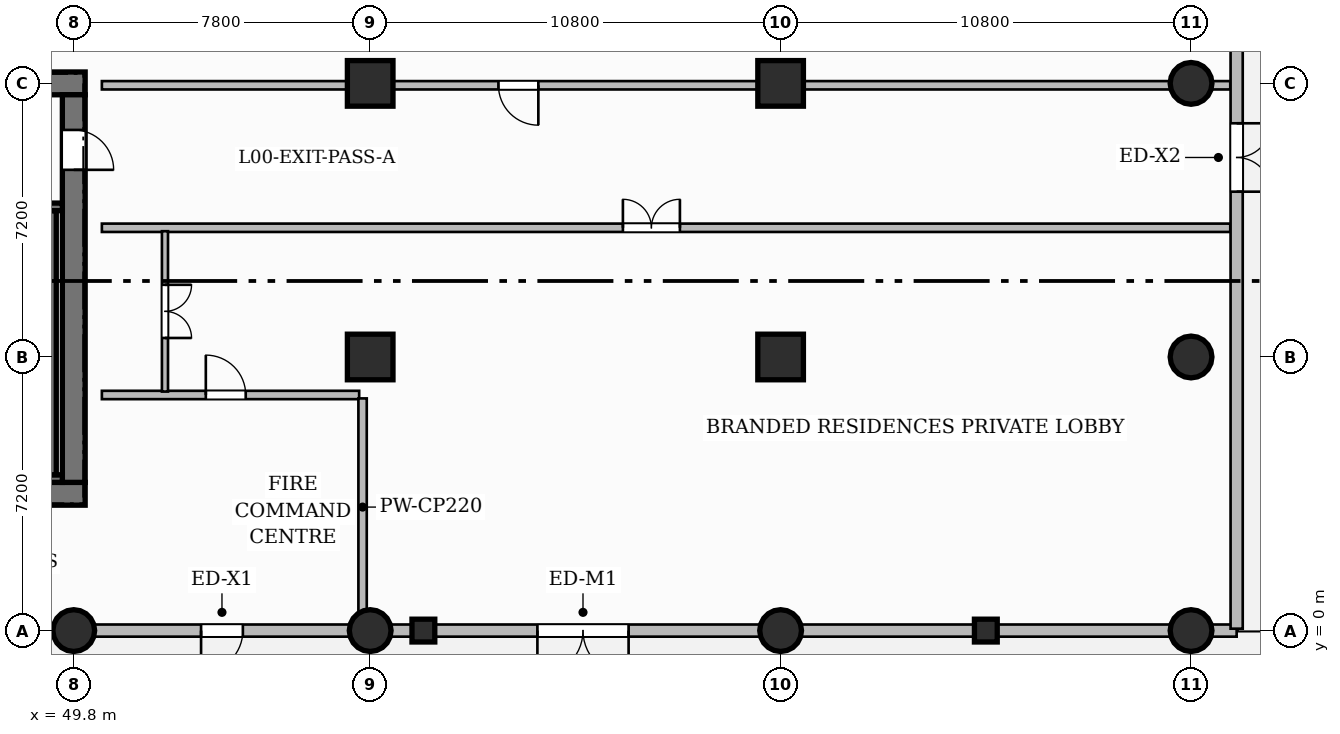
"""IFC4 building model, lengths in metres.
Left out: names, types, materials, properties, quantities, classifications, styles, units other than length and angle.
Written with IfcOpenShell. Run it as: python <this file> out.ifc"""

import sys

from ifc_helpers import new_model, si_unit, direction, frame, frame_2d, origin, origin_2d, place, context, subcontext, project, spatial, rectangle, circle, extrude, source, transform, mapped, element, fill, save


model = new_model("IFC4")
c1 = context("Model", 3, precision=1e-05, world=origin(), true_north=direction((0.0, 1.0)))
c2 = subcontext(c1, "Body", "Model", "MODEL_VIEW")
j1 = project(units=[si_unit("LENGTHUNIT", "METRE"), si_unit("PLANEANGLEUNIT", "RADIAN")], contexts=[c1])
p1 = place(None, origin())
s1 = spatial("IfcSite", under=j1, at=p1, CompositionType="ELEMENT")
p2 = place(p1, origin())
s2 = spatial("IfcBuilding", under=s1, at=p2, CompositionType="ELEMENT")
p3 = place(p2, origin())
s3 = spatial("IfcBuildingStorey", under=s2, at=p3, CompositionType="ELEMENT", Elevation=0.0)
p4 = place(p3, frame((34.5, 3.6, 0.0), z_axis=(0.0, 0.0, 1.0), x_axis=(1.0, 0.0, 0.0)))
e1 = element("IfcWall", 1, at=p4, inside=s3, PredefinedType="SHEAR", context=c2, shape_type="SweptSolid", body=[
    extrude(rectangle(XDim=15.6, YDim=0.6, at=frame_2d((7.8, 0.0))), origin(), (0.0, 0.0, 1.0), 5.4),
])
p5 = place(p4, frame((4.77, 0.0, 0.0)))
e2 = element("IfcOpeningElement", 2, at=p5, cuts=e1, PredefinedType="OPENING", context=c2, shape_type="SweptSolid", body=[
    extrude(rectangle(XDim=0.9, YDim=2.1, at=frame_2d((0.45, 1.05))), frame((0.0, 0.31, 0.0), z_axis=(0.0, -1.0, 0.0), x_axis=(1.0, 0.0, 0.0)), (0.0, 0.0, 1.0), 0.62),
])
p6 = place(p4, frame((7.15, 0.0, 0.0)))
e3 = element("IfcOpeningElement", 3, at=p6, cuts=e1, PredefinedType="OPENING", context=c2, shape_type="SweptSolid", body=[
    extrude(rectangle(XDim=0.9, YDim=2.1, at=frame_2d((0.45, 1.05))), frame((0.0, 0.31, 0.0), z_axis=(0.0, -1.0, 0.0), x_axis=(1.0, 0.0, 0.0)), (0.0, 0.0, 1.0), 0.62),
])
p7 = place(p3, frame((34.5, 14.4, 0.0), z_axis=(0.0, 0.0, 1.0), x_axis=(1.0, 0.0, 0.0)))
e4 = element("IfcWall", 4, at=p7, inside=s3, PredefinedType="SHEAR", context=c2, shape_type="SweptSolid", body=[
    extrude(rectangle(XDim=15.6, YDim=0.6, at=frame_2d((7.8, 0.0))), origin(), (0.0, 0.0, 1.0), 5.4),
])
p8 = place(p7, frame((5.43, 0.0, 0.0)))
e5 = element("IfcOpeningElement", 5, at=p8, cuts=e4, PredefinedType="OPENING", context=c2, shape_type="SweptSolid", body=[
    extrude(rectangle(XDim=1.5, YDim=2.2, at=frame_2d((0.75, 1.1))), frame((0.0, 0.31, 0.0), z_axis=(0.0, -1.0, 0.0), x_axis=(1.0, 0.0, 0.0)), (0.0, 0.0, 1.0), 0.62),
])
p9 = place(p7, frame((1.645, 0.0, 0.0)))
e6 = element("IfcOpeningElement", 6, at=p9, cuts=e4, PredefinedType="OPENING", context=c2, shape_type="SweptSolid", body=[
    extrude(rectangle(XDim=1.05, YDim=2.15, at=frame_2d((0.525, 1.075))), frame((0.0, 0.31, 0.0), z_axis=(0.0, -1.0, 0.0), x_axis=(1.0, 0.0, 0.0)), (0.0, 0.0, 1.0), 0.62),
])
p10 = place(p7, frame((11.275, 0.0, 0.0)))
e7 = element("IfcOpeningElement", 7, at=p10, cuts=e4, PredefinedType="OPENING", context=c2, shape_type="SweptSolid", body=[
    extrude(rectangle(XDim=1.05, YDim=2.15, at=frame_2d((0.525, 1.075))), frame((0.0, 0.31, 0.0), z_axis=(0.0, -1.0, 0.0), x_axis=(1.0, 0.0, 0.0)), (0.0, 0.0, 1.0), 0.62),
])
p11 = place(p3, frame((49.8, 3.9, 0.0), z_axis=(0.0, 0.0, 1.0), x_axis=(0.0, 1.0, 0.0)))
e8 = element("IfcWall", 8, at=p11, inside=s3, PredefinedType="SHEAR", context=c2, shape_type="SweptSolid", body=[
    extrude(rectangle(XDim=10.2, YDim=0.6, at=frame_2d((5.1, 0.0))), origin(), (0.0, 0.0, 1.0), 5.4),
])
p12 = place(p11, frame((8.225, 0.0, 0.0)))
e9 = element("IfcOpeningElement", 9, at=p12, cuts=e8, PredefinedType="OPENING", context=c2, shape_type="SweptSolid", body=[
    extrude(rectangle(XDim=1.05, YDim=2.2, at=frame_2d((0.525, 1.1))), frame((0.0, 0.31, 0.0), z_axis=(0.0, -1.0, 0.0), x_axis=(1.0, 0.0, 0.0)), (0.0, 0.0, 1.0), 0.62),
])
m1 = source(origin(), c2, "Body", "SweptSolid", [
    extrude(circle(Radius=0.55, at=origin_2d()), origin(), (0.0, 0.0, 1.0), 5.4),
])
for number, where, z_axis, x_axis in (
    (10, (49.8, 0.0, 0.0), (0.0, 0.0, 1.0), (1.0, 0.0, 0.0)),
    (11, (57.6, 0.0, 0.0), (0.0, 0.0, 1.0), (1.0, 0.0, 0.0)),
):
    element("IfcColumn", number, at=place(p3, frame(where, z_axis=z_axis, x_axis=x_axis)), inside=s3, PredefinedType="COLUMN", context=c2, shape_type="MappedRepresentation", body=[
        mapped(m1, transform((0.0, 0.0, 0.0), scale=1.0)),
    ])
m2 = source(origin(), c2, "Body", "SweptSolid", [
    extrude(rectangle(XDim=1.2, YDim=1.2, at=origin_2d()), origin(), (0.0, 0.0, 1.0), 5.4),
])
for number, where, z_axis, x_axis in (
    (12, (57.6, 7.2, 0.0), (0.0, 0.0, 1.0), (1.0, 0.0, 0.0)),
    (13, (57.6, 14.4, 0.0), (0.0, 0.0, 1.0), (1.0, 0.0, 0.0)),
):
    element("IfcColumn", number, at=place(p3, frame(where, z_axis=z_axis, x_axis=x_axis)), inside=s3, PredefinedType="COLUMN", context=c2, shape_type="MappedRepresentation", body=[
        mapped(m2, transform((0.0, 0.0, 0.0), scale=1.0)),
    ])
p13 = place(p3, frame((68.4, 0.0, 0.0), z_axis=(0.0, 0.0, 1.0), x_axis=(1.0, 0.0, 0.0)))
e14 = element("IfcColumn", 14, at=p13, inside=s3, PredefinedType="COLUMN", context=c2, shape_type="MappedRepresentation", body=[
    mapped(m1, transform((0.0, 0.0, 0.0), scale=1.0)),
])
for number, where, z_axis, x_axis in (
    (15, (68.4, 7.2, 0.0), (0.0, 0.0, 1.0), (1.0, 0.0, 0.0)),
    (16, (68.4, 14.4, 0.0), (0.0, 0.0, 1.0), (1.0, 0.0, 0.0)),
):
    element("IfcColumn", number, at=place(p3, frame(where, z_axis=z_axis, x_axis=x_axis)), inside=s3, PredefinedType="COLUMN", context=c2, shape_type="MappedRepresentation", body=[
        mapped(m2, transform((0.0, 0.0, 0.0), scale=1.0)),
    ])
for number, where, z_axis, x_axis in (
    (17, (79.2, 0.0, 0.0), (0.0, 0.0, 1.0), (1.0, 0.0, 0.0)),
    (18, (79.2, 7.2, 0.0), (0.0, 0.0, 1.0), (1.0, 0.0, 0.0)),
    (19, (79.2, 14.4, 0.0), (0.0, 0.0, 1.0), (1.0, 0.0, 0.0)),
):
    element("IfcColumn", number, at=place(p3, frame(where, z_axis=z_axis, x_axis=x_axis)), inside=s3, PredefinedType="COLUMN", context=c2, shape_type="MappedRepresentation", body=[
        mapped(m1, transform((0.0, 0.0, 0.0), scale=1.0)),
    ])
m3 = source(origin(), c2, "Body", "SweptSolid", [
    extrude(rectangle(XDim=0.6, YDim=0.6, at=origin_2d()), origin(), (0.0, 0.0, 1.0), 5.4),
])
for number, where, z_axis, x_axis in (
    (20, (59.0, 0.0, 0.0), (0.0, 0.0, 1.0), (1.0, 0.0, 0.0)),
    (21, (73.8, 0.0, 0.0), (0.0, 0.0, 1.0), (1.0, 0.0, 0.0)),
):
    element("IfcColumn", number, at=place(p3, frame(where, z_axis=z_axis, x_axis=x_axis)), inside=s3, PredefinedType="PILASTER", context=c2, shape_type="MappedRepresentation", body=[
        mapped(m3, transform((0.0, 0.0, 0.0), scale=1.0)),
    ])
p14 = place(p3, frame((43.12, 4.0, 0.0), z_axis=(0.0, 0.0, 1.0), x_axis=(1.0, 0.0, 0.0)))
e22 = element("IfcWall", 22, at=p14, inside=s3, PredefinedType="SHEAR", context=c2, shape_type="SweptSolid", body=[
    extrude(rectangle(XDim=6.38, YDim=0.2, at=frame_2d((3.19, 0.0))), origin(), (0.0, 0.0, 1.0), 5.4),
])
p15 = place(p3, frame((49.24, 4.1, 0.0), z_axis=(0.0, 0.0, 1.0), x_axis=(0.0, 1.0, 0.0)))
e23 = element("IfcWall", 23, at=p15, inside=s3, PredefinedType="SHEAR", context=c2, shape_type="SweptSolid", body=[
    extrude(rectangle(XDim=6.95, YDim=0.2, at=frame_2d((3.475, 0.0))), origin(), (0.0, 0.0, 1.0), 5.4),
])
p16 = place(p3, frame((43.12, 11.15, 0.0), z_axis=(0.0, 0.0, 1.0), x_axis=(1.0, 0.0, 0.0)))
e24 = element("IfcWall", 24, at=p16, inside=s3, PredefinedType="SHEAR", context=c2, shape_type="SweptSolid", body=[
    extrude(rectangle(XDim=6.38, YDim=0.2, at=frame_2d((3.19, 0.0))), origin(), (0.0, 0.0, 1.0), 5.4),
])
p17 = place(p16, frame((1.045, 0.0, 0.0)))
e25 = element("IfcOpeningElement", 25, at=p17, cuts=e24, PredefinedType="OPENING", context=c2, shape_type="SweptSolid", body=[
    extrude(rectangle(XDim=1.05, YDim=2.2, at=frame_2d((0.525, 1.1))), frame((0.0, 0.11, 0.0), z_axis=(0.0, -1.0, 0.0), x_axis=(1.0, 0.0, 0.0)), (0.0, 0.0, 1.0), 0.22),
])
p18 = place(p16, frame((4.125, 0.0, 0.0)))
e26 = element("IfcOpeningElement", 26, at=p18, cuts=e24, PredefinedType="OPENING", context=c2, shape_type="SweptSolid", body=[
    extrude(rectangle(XDim=1.05, YDim=2.2, at=frame_2d((0.525, 1.1))), frame((0.0, 0.11, 0.0), z_axis=(0.0, -1.0, 0.0), x_axis=(1.0, 0.0, 0.0)), (0.0, 0.0, 1.0), 0.22),
])
p19 = place(p3, frame((50.54, 10.6, 0.0), z_axis=(0.0, 0.0, 1.0), x_axis=(1.0, 0.0, 0.0)))
e27 = element("IfcWall", 27, at=p19, inside=s3, PredefinedType="PARTITIONING", context=c2, shape_type="SweptSolid", body=[
    extrude(rectangle(XDim=29.692, YDim=0.22, at=frame_2d((14.846, 0.0))), origin(), (0.0, 0.0, 1.0), 5.1),
])
p20 = place(p19, frame((13.71, 0.0, 0.0)))
e28 = element("IfcOpeningElement", 28, at=p20, cuts=e27, PredefinedType="OPENING", context=c2, shape_type="SweptSolid", body=[
    extrude(rectangle(XDim=1.5, YDim=2.2, at=frame_2d((0.75, 1.1))), frame((0.0, 0.12, 0.0), z_axis=(0.0, -1.0, 0.0), x_axis=(1.0, 0.0, 0.0)), (0.0, 0.0, 1.0), 0.24),
])
p21 = place(p3, frame((50.54, 14.35, 0.0), z_axis=(0.0, 0.0, 1.0), x_axis=(1.0, 0.0, 0.0)))
e29 = element("IfcWall", 29, at=p21, inside=s3, PredefinedType="PARTITIONING", context=c2, shape_type="SweptSolid", body=[
    extrude(rectangle(XDim=29.692, YDim=0.22, at=frame_2d((14.846, 0.0))), origin(), (0.0, 0.0, 1.0), 4.085),
])
p22 = place(p21, frame((10.435, 0.0, 0.0)))
e30 = element("IfcOpeningElement", 30, at=p22, cuts=e29, PredefinedType="OPENING", context=c2, shape_type="SweptSolid", body=[
    extrude(rectangle(XDim=1.05, YDim=2.15, at=frame_2d((0.525, 1.075))), frame((0.0, 0.12, 0.0), z_axis=(0.0, -1.0, 0.0), x_axis=(1.0, 0.0, 0.0)), (0.0, 0.0, 1.0), 0.24),
])
p23 = place(p3, frame((50.54, 6.2, 0.0), z_axis=(0.0, 0.0, 1.0), x_axis=(1.0, 0.0, 0.0)))
e31 = element("IfcWall", 31, at=p23, inside=s3, PredefinedType="PARTITIONING", context=c2, shape_type="SweptSolid", body=[
    extrude(rectangle(XDim=6.77, YDim=0.22, at=frame_2d((3.385, 0.0))), origin(), (0.0, 0.0, 1.0), 5.1),
])
p24 = place(p23, frame((2.735, 0.0, 0.0)))
e32 = element("IfcOpeningElement", 32, at=p24, cuts=e31, PredefinedType="OPENING", context=c2, shape_type="SweptSolid", body=[
    extrude(rectangle(XDim=1.05, YDim=2.15, at=frame_2d((0.525, 1.075))), frame((0.0, 0.12, 0.0), z_axis=(0.0, -1.0, 0.0), x_axis=(1.0, 0.0, 0.0)), (0.0, 0.0, 1.0), 0.24),
])
p25 = place(p3, frame((57.4, 0.39, 0.0), z_axis=(0.0, 0.0, 1.0), x_axis=(0.0, 1.0, 0.0)))
e33 = element("IfcWall", 33, at=p25, inside=s3, PredefinedType="PARTITIONING", context=c2, shape_type="SweptSolid", body=[
    extrude(rectangle(XDim=5.72, YDim=0.22, at=frame_2d((2.86, 0.0))), origin(), (0.0, 0.0, 1.0), 4.085),
])
p26 = place(p3, frame((52.2, 10.51, 0.0), z_axis=(0.0, 0.0, 1.0), x_axis=(0.0, -1.0, 0.0)))
e34 = element("IfcWall", 34, at=p26, inside=s3, PredefinedType="PARTITIONING", context=c2, shape_type="SweptSolid", body=[
    extrude(rectangle(XDim=4.22, YDim=0.16, at=frame_2d((2.11, 0.0))), origin(), (0.0, 0.0, 1.0), 5.1),
])
p27 = place(p26, frame((1.41, 0.0, 0.0)))
e35 = element("IfcOpeningElement", 35, at=p27, cuts=e34, PredefinedType="OPENING", context=c2, shape_type="SweptSolid", body=[
    extrude(rectangle(XDim=1.4, YDim=2.35, at=frame_2d((0.7, 1.175))), frame((0.0, 0.09, 0.0), z_axis=(0.0, -1.0, 0.0), x_axis=(1.0, 0.0, 0.0)), (0.0, 0.0, 1.0), 0.18),
])
p28 = place(p3, frame((28.35, 0.0, 0.0), z_axis=(0.0, 0.0, 1.0), x_axis=(1.0, 0.0, 0.0)))
e36 = element("IfcWall", 36, at=p28, inside=s3, PredefinedType="SOLIDWALL", context=c2, shape_type="SweptSolid", body=[
    extrude(rectangle(XDim=52.05, YDim=0.32, at=frame_2d((26.025, 0.0))), origin(), (0.0, 0.0, 1.0), 4.085),
])
p29 = place(p28, frame((24.8, 0.0, 0.0)))
e37 = element("IfcOpeningElement", 37, at=p29, cuts=e36, PredefinedType="OPENING", context=c2, shape_type="SweptSolid", body=[
    extrude(rectangle(XDim=1.1, YDim=2.2, at=frame_2d((0.55, 1.1))), frame((0.0, 0.17, 0.0), z_axis=(0.0, -1.0, 0.0), x_axis=(1.0, 0.0, 0.0)), (0.0, 0.0, 1.0), 0.34),
])
p30 = place(p28, frame((33.65, 0.0, 0.0)))
e38 = element("IfcOpeningElement", 38, at=p30, cuts=e36, PredefinedType="OPENING", context=c2, shape_type="SweptSolid", body=[
    extrude(rectangle(XDim=2.4, YDim=2.8, at=frame_2d((1.2, 1.4))), frame((0.0, 0.17, 0.0), z_axis=(0.0, -1.0, 0.0), x_axis=(1.0, 0.0, 0.0)), (0.0, 0.0, 1.0), 0.34),
])
p31 = place(p3, frame((80.4, 0.05, 0.0), z_axis=(0.0, 0.0, 1.0), x_axis=(0.0, 1.0, 0.0)))
e39 = element("IfcWall", 39, at=p31, inside=s3, PredefinedType="SOLIDWALL", context=c2, shape_type="SweptSolid", body=[
    extrude(rectangle(XDim=46.7, YDim=0.32, at=frame_2d((23.35, 0.0))), origin(), (0.0, 0.0, 1.0), 5.1),
])
p32 = place(p31, frame((11.5, 0.0, 0.0)))
e40 = element("IfcOpeningElement", 40, at=p32, cuts=e39, PredefinedType="OPENING", context=c2, shape_type="SweptSolid", body=[
    extrude(rectangle(XDim=1.8, YDim=2.4, at=frame_2d((0.9, 1.2))), frame((0.0, 0.17, 0.0), z_axis=(0.0, -1.0, 0.0), x_axis=(1.0, 0.0, 0.0)), (0.0, 0.0, 1.0), 0.34),
])
p33 = place(p31, frame((16.75, 0.0, 0.0)))
e41 = element("IfcOpeningElement", 41, at=p33, cuts=e39, PredefinedType="OPENING", context=c2, shape_type="SweptSolid", body=[
    extrude(rectangle(XDim=2.4, YDim=2.8, at=frame_2d((1.2, 1.4))), frame((0.0, 0.17, 0.0), z_axis=(0.0, -1.0, 0.0), x_axis=(1.0, 0.0, 0.0)), (0.0, 0.0, 1.0), 0.34),
])
p34 = place(p31, frame((42.25, 0.0, 0.0)))
e42 = element("IfcOpeningElement", 42, at=p34, cuts=e39, PredefinedType="OPENING", context=c2, shape_type="SweptSolid", body=[
    extrude(rectangle(XDim=1.8, YDim=2.4, at=frame_2d((0.9, 1.2))), frame((0.0, 0.17, 0.0), z_axis=(0.0, -1.0, 0.0), x_axis=(1.0, 0.0, 0.0)), (0.0, 0.0, 1.0), 0.34),
])
m4 = source(origin(), c2, "Body", "SweptSolid", [
    extrude(rectangle(XDim=1.05, YDim=2.2, at=frame_2d((0.525, 1.1))), frame((0.0, 0.025, 0.0), z_axis=(0.0, -1.0, 0.0), x_axis=(1.0, 0.0, 0.0)), (0.0, 0.0, 1.0), 0.05),
])
p35 = place(p12, frame((1.05, 0.0, 0.0), z_axis=(0.0, 0.0, 1.0), x_axis=(-1.0, 0.0, 0.0)))
e43 = element("IfcDoor", 43, at=p35, inside=s3, OperationType="SINGLE_SWING_LEFT", PredefinedType="DOOR", context=c2, shape_type="MappedRepresentation", body=[
    mapped(m4, transform((0.0, 0.0, 0.0), scale=1.0)),
])
fill(e9, e43)
m5 = source(origin(), c2, "Body", "SweptSolid", [
    extrude(rectangle(XDim=1.5, YDim=2.2, at=frame_2d((0.75, 1.1))), frame((0.0, 0.025, 0.0), z_axis=(0.0, -1.0, 0.0), x_axis=(1.0, 0.0, 0.0)), (0.0, 0.0, 1.0), 0.05),
])
p36 = place(p20, origin())
e44 = element("IfcDoor", 44, at=p36, inside=s3, OperationType="DOUBLE_DOOR_SINGLE_SWING", PredefinedType="DOOR", context=c2, shape_type="MappedRepresentation", body=[
    mapped(m5, transform((0.0, 0.0, 0.0), scale=1.0)),
])
fill(e28, e44)
m6 = source(origin(), c2, "Body", "SweptSolid", [
    extrude(rectangle(XDim=1.05, YDim=2.15, at=frame_2d((0.525, 1.075))), frame((0.0, 0.025, 0.0), z_axis=(0.0, -1.0, 0.0), x_axis=(1.0, 0.0, 0.0)), (0.0, 0.0, 1.0), 0.05),
])
p37 = place(p22, frame((1.05, 0.0, 0.0), z_axis=(0.0, 0.0, 1.0), x_axis=(-1.0, 0.0, 0.0)))
e45 = element("IfcDoor", 45, at=p37, inside=s3, OperationType="SINGLE_SWING_RIGHT", PredefinedType="DOOR", context=c2, shape_type="MappedRepresentation", body=[
    mapped(m6, transform((0.0, 0.0, 0.0), scale=1.0)),
])
fill(e30, e45)
p38 = place(p24, origin())
e46 = element("IfcDoor", 46, at=p38, inside=s3, OperationType="SINGLE_SWING_LEFT", PredefinedType="DOOR", context=c2, shape_type="MappedRepresentation", body=[
    mapped(m6, transform((0.0, 0.0, 0.0), scale=1.0)),
])
fill(e32, e46)
m7 = source(origin(), c2, "Body", "SweptSolid", [
    extrude(rectangle(XDim=1.4, YDim=2.35, at=frame_2d((0.7, 1.175))), frame((0.0, 0.025, 0.0), z_axis=(0.0, -1.0, 0.0), x_axis=(1.0, 0.0, 0.0)), (0.0, 0.0, 1.0), 0.05),
])
p39 = place(p27, origin())
e47 = element("IfcDoor", 47, at=p39, inside=s3, OperationType="DOUBLE_DOOR_SINGLE_SWING", PredefinedType="DOOR", context=c2, shape_type="MappedRepresentation", body=[
    mapped(m7, transform((0.0, 0.0, 0.0), scale=1.0)),
])
fill(e35, e47)
m8 = source(origin(), c2, "Body", "SweptSolid", [
    extrude(rectangle(XDim=1.1, YDim=2.2, at=frame_2d((0.55, 1.1))), frame((0.0, 0.025, 0.0), z_axis=(0.0, -1.0, 0.0), x_axis=(1.0, 0.0, 0.0)), (0.0, 0.0, 1.0), 0.05),
])
p40 = place(p29, frame((1.1, 0.0, 0.0), z_axis=(0.0, 0.0, 1.0), x_axis=(-1.0, 0.0, 0.0)))
e48 = element("IfcDoor", 48, at=p40, inside=s3, OperationType="SINGLE_SWING_LEFT", PredefinedType="DOOR", context=c2, shape_type="MappedRepresentation", body=[
    mapped(m8, transform((0.0, 0.0, 0.0), scale=1.0)),
])
fill(e37, e48)
m9 = source(origin(), c2, "Body", "SweptSolid", [
    extrude(rectangle(XDim=2.4, YDim=2.8, at=frame_2d((1.2, 1.4))), frame((0.0, 0.025, 0.0), z_axis=(0.0, -1.0, 0.0), x_axis=(1.0, 0.0, 0.0)), (0.0, 0.0, 1.0), 0.05),
])
p41 = place(p30, frame((2.4, 0.0, 0.0), z_axis=(0.0, 0.0, 1.0), x_axis=(-1.0, 0.0, 0.0)))
e49 = element("IfcDoor", 49, at=p41, inside=s3, OperationType="DOUBLE_DOOR_SINGLE_SWING", PredefinedType="DOOR", context=c2, shape_type="MappedRepresentation", body=[
    mapped(m9, transform((0.0, 0.0, 0.0), scale=1.0)),
])
fill(e38, e49)
m10 = source(origin(), c2, "Body", "SweptSolid", [
    extrude(rectangle(XDim=1.8, YDim=2.4, at=frame_2d((0.9, 1.2))), frame((0.0, 0.025, 0.0), z_axis=(0.0, -1.0, 0.0), x_axis=(1.0, 0.0, 0.0)), (0.0, 0.0, 1.0), 0.05),
])
p42 = place(p32, frame((1.8, 0.0, 0.0), z_axis=(0.0, 0.0, 1.0), x_axis=(-1.0, 0.0, 0.0)))
e50 = element("IfcDoor", 50, at=p42, inside=s3, OperationType="DOUBLE_DOOR_SINGLE_SWING", PredefinedType="DOOR", context=c2, shape_type="MappedRepresentation", body=[
    mapped(m10, transform((0.0, 0.0, 0.0), scale=1.0)),
])
fill(e40, e50)
save(model, sys.argv[1])
